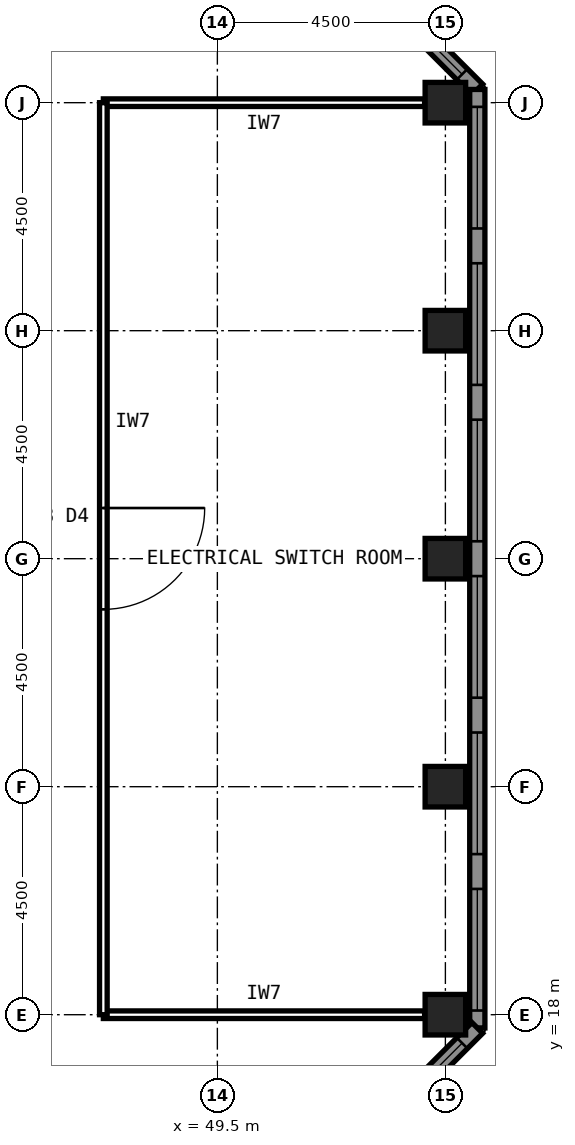
"""IFC4 building model, lengths in metres.
Left out: names, types, materials, properties, quantities, classifications, styles, units other than length and angle.
Written with IfcOpenShell. Run it as: python <this file> out.ifc"""

import sys

from ifc_helpers import new_model, si_unit, direction, frame, frame_2d, origin, origin_2d, place, context, subcontext, project, spatial, polyline, rectangle, hollow_rectangle, outline, extrude, element, fill, save


model = new_model("IFC4")
c1 = context("Model", 3, precision=1e-05, world=origin(), true_north=direction((0.0, 1.0)))
c2 = subcontext(c1, "Body", "Model", "MODEL_VIEW")
j1 = project(units=[si_unit("LENGTHUNIT", "METRE"), si_unit("PLANEANGLEUNIT", "RADIAN")], contexts=[c1])
p1 = place(None, origin())
s1 = spatial("IfcSite", under=j1, at=p1, CompositionType="ELEMENT")
p2 = place(p1, origin())
s2 = spatial("IfcBuilding", under=s1, at=p2, CompositionType="ELEMENT")
p3 = place(p2, frame((0.0, 0.0, 320.1)))
s3 = spatial("IfcBuildingStorey", under=s2, at=p3, CompositionType="ELEMENT", Elevation=320.1)
p4 = place(p3, frame((54.0, 18.0, 0.0), z_axis=(0.0, 0.0, 1.0), x_axis=(1.0, 0.0, 0.0)))
e1 = element("IfcColumn", 1, at=p4, inside=s3, PredefinedType="COLUMN", context=c2, shape_type="SweptSolid", body=[
    extrude(hollow_rectangle(XDim=0.8, YDim=0.8, WallThickness=0.045, at=origin_2d()), origin(), (0.0, 0.0, 1.0), 9.7),
])
p5 = place(p3, frame((54.0, 22.5, 0.0), z_axis=(0.0, 0.0, 1.0), x_axis=(1.0, 0.0, 0.0)))
e2 = element("IfcColumn", 2, at=p5, inside=s3, PredefinedType="COLUMN", context=c2, shape_type="SweptSolid", body=[
    extrude(hollow_rectangle(XDim=0.8, YDim=0.8, WallThickness=0.045, at=origin_2d()), origin(), (0.0, 0.0, 1.0), 11.977),
])
p6 = place(p3, frame((54.0, 27.0, 0.0), z_axis=(0.0, 0.0, 1.0), x_axis=(1.0, 0.0, 0.0)))
e3 = element("IfcColumn", 3, at=p6, inside=s3, PredefinedType="COLUMN", context=c2, shape_type="SweptSolid", body=[
    extrude(hollow_rectangle(XDim=0.8, YDim=0.8, WallThickness=0.045, at=origin_2d()), origin(), (0.0, 0.0, 1.0), 12.189),
])
p7 = place(p3, frame((54.0, 31.5, 0.0), z_axis=(0.0, 0.0, 1.0), x_axis=(1.0, 0.0, 0.0)))
e4 = element("IfcColumn", 4, at=p7, inside=s3, PredefinedType="COLUMN", context=c2, shape_type="SweptSolid", body=[
    extrude(hollow_rectangle(XDim=0.8, YDim=0.8, WallThickness=0.045, at=origin_2d()), origin(), (0.0, 0.0, 1.0), 14.677),
])
p8 = place(p3, frame((54.0, 36.0, 0.0), z_axis=(0.0, 0.0, 1.0), x_axis=(1.0, 0.0, 0.0)))
e5 = element("IfcColumn", 5, at=p8, inside=s3, PredefinedType="COLUMN", context=c2, shape_type="SweptSolid", body=[
    extrude(hollow_rectangle(XDim=0.8, YDim=0.8, WallThickness=0.045, at=origin_2d()), origin(), (0.0, 0.0, 1.0), 15.1),
])
p9 = place(p3, frame((36.261, 54.63, 0.0), z_axis=(0.0, 0.0, 1.0), x_axis=(0.707106781187, -0.707106781187, 0.0)))
e6 = element("IfcWall", 6, at=p9, inside=s3, PredefinedType="SOLIDWALL", context=c2, shape_type="SweptSolid", body=[
    extrude(outline(polyline([(0.0, 0.0), (25.978, 0.0), (25.978, 18.278), (0.0, 23.789), (0.0, 0.0)])), frame((0.0, 0.15, 0.0), z_axis=(0.0, -1.0, 0.0), x_axis=(1.0, 0.0, 0.0)), (0.0, 0.0, 1.0), 0.3),
])
p10 = place(p9, frame((0.424, 0.0, 1.2)))
e7 = element("IfcOpeningElement", 7, at=p10, cuts=e6, PredefinedType="OPENING", context=c2, shape_type="SweptSolid", body=[
    extrude(rectangle(XDim=2.4, YDim=2.4, at=frame_2d((1.2, 1.2))), frame((0.0, 0.16, 0.0), z_axis=(0.0, -1.0, 0.0), x_axis=(1.0, 0.0, 0.0)), (0.0, 0.0, 1.0), 0.32),
])
p11 = place(p9, frame((3.671, 0.0, 1.2)))
e8 = element("IfcOpeningElement", 8, at=p11, cuts=e6, PredefinedType="OPENING", context=c2, shape_type="SweptSolid", body=[
    extrude(rectangle(XDim=2.4, YDim=2.4, at=frame_2d((1.2, 1.2))), frame((0.0, 0.16, 0.0), z_axis=(0.0, -1.0, 0.0), x_axis=(1.0, 0.0, 0.0)), (0.0, 0.0, 1.0), 0.32),
])
p12 = place(p9, frame((6.918, 0.0, 11.3)))
e9 = element("IfcOpeningElement", 9, at=p12, cuts=e6, PredefinedType="OPENING", context=c2, shape_type="SweptSolid", body=[
    extrude(rectangle(XDim=2.4, YDim=2.4, at=frame_2d((1.2, 1.2))), frame((0.0, 0.16, 0.0), z_axis=(0.0, -1.0, 0.0), x_axis=(1.0, 0.0, 0.0)), (0.0, 0.0, 1.0), 0.32),
])
p13 = place(p9, frame((10.165, 0.0, 11.15)))
e10 = element("IfcOpeningElement", 10, at=p13, cuts=e6, PredefinedType="OPENING", context=c2, shape_type="SweptSolid", body=[
    extrude(rectangle(XDim=2.4, YDim=2.4, at=frame_2d((1.2, 1.2))), frame((0.0, 0.16, 0.0), z_axis=(0.0, -1.0, 0.0), x_axis=(1.0, 0.0, 0.0)), (0.0, 0.0, 1.0), 0.32),
])
p14 = place(p9, frame((13.412, 0.0, 1.2)))
e11 = element("IfcOpeningElement", 11, at=p14, cuts=e6, PredefinedType="OPENING", context=c2, shape_type="SweptSolid", body=[
    extrude(rectangle(XDim=2.4, YDim=2.4, at=frame_2d((1.2, 1.2))), frame((0.0, 0.16, 0.0), z_axis=(0.0, -1.0, 0.0), x_axis=(1.0, 0.0, 0.0)), (0.0, 0.0, 1.0), 0.32),
])
p15 = place(p9, frame((16.66, 0.0, 1.2)))
e12 = element("IfcOpeningElement", 12, at=p15, cuts=e6, PredefinedType="OPENING", context=c2, shape_type="SweptSolid", body=[
    extrude(rectangle(XDim=2.4, YDim=2.4, at=frame_2d((1.2, 1.2))), frame((0.0, 0.16, 0.0), z_axis=(0.0, -1.0, 0.0), x_axis=(1.0, 0.0, 0.0)), (0.0, 0.0, 1.0), 0.32),
])
p16 = place(p9, frame((19.907, 0.0, 1.2)))
e13 = element("IfcOpeningElement", 13, at=p16, cuts=e6, PredefinedType="OPENING", context=c2, shape_type="SweptSolid", body=[
    extrude(rectangle(XDim=2.4, YDim=2.4, at=frame_2d((1.2, 1.2))), frame((0.0, 0.16, 0.0), z_axis=(0.0, -1.0, 0.0), x_axis=(1.0, 0.0, 0.0)), (0.0, 0.0, 1.0), 0.32),
])
p17 = place(p9, frame((23.154, 0.0, 1.2)))
e14 = element("IfcOpeningElement", 14, at=p17, cuts=e6, PredefinedType="OPENING", context=c2, shape_type="SweptSolid", body=[
    extrude(rectangle(XDim=2.4, YDim=2.4, at=frame_2d((1.2, 1.2))), frame((0.0, 0.16, 0.0), z_axis=(0.0, -1.0, 0.0), x_axis=(1.0, 0.0, 0.0)), (0.0, 0.0, 1.0), 0.32),
])
p18 = place(p3, frame((54.63, 36.261, 0.0), z_axis=(0.0, 0.0, 1.0), x_axis=(0.0, -1.0, 0.0)))
e15 = element("IfcWall", 15, at=p18, inside=s3, PredefinedType="SOLIDWALL", context=c2, shape_type="SweptSolid", body=[
    extrude(outline(polyline([(0.0, 0.0), (18.522, 0.0), (18.522, 12.722), (0.0, 18.278), (0.0, 0.0)])), frame((0.0, 0.15, 0.0), z_axis=(0.0, -1.0, 0.0), x_axis=(1.0, 0.0, 0.0)), (0.0, 0.0, 1.0), 0.3),
])
p19 = place(p18, frame((0.344, 0.0, 11.4)))
e16 = element("IfcOpeningElement", 16, at=p19, cuts=e15, PredefinedType="OPENING", context=c2, shape_type="SweptSolid", body=[
    extrude(rectangle(XDim=2.4, YDim=2.4, at=frame_2d((1.2, 1.2))), frame((0.0, 0.16, 0.0), z_axis=(0.0, -1.0, 0.0), x_axis=(1.0, 0.0, 0.0)), (0.0, 0.0, 1.0), 0.32),
])
p20 = place(p18, frame((3.43, 0.0, 1.65)))
e17 = element("IfcOpeningElement", 17, at=p20, cuts=e15, PredefinedType="OPENING", context=c2, shape_type="SweptSolid", body=[
    extrude(rectangle(XDim=2.4, YDim=2.4, at=frame_2d((1.2, 1.2))), frame((0.0, 0.16, 0.0), z_axis=(0.0, -1.0, 0.0), x_axis=(1.0, 0.0, 0.0)), (0.0, 0.0, 1.0), 0.32),
])
p21 = place(p18, frame((6.518, 0.0, 1.2)))
e18 = element("IfcOpeningElement", 18, at=p21, cuts=e15, PredefinedType="OPENING", context=c2, shape_type="SweptSolid", body=[
    extrude(rectangle(XDim=2.4, YDim=2.4, at=frame_2d((1.2, 1.2))), frame((0.0, 0.16, 0.0), z_axis=(0.0, -1.0, 0.0), x_axis=(1.0, 0.0, 0.0)), (0.0, 0.0, 1.0), 0.32),
])
p22 = place(p18, frame((9.604, 0.0, 1.2)))
e19 = element("IfcOpeningElement", 19, at=p22, cuts=e15, PredefinedType="OPENING", context=c2, shape_type="SweptSolid", body=[
    extrude(rectangle(XDim=2.4, YDim=2.4, at=frame_2d((1.2, 1.2))), frame((0.0, 0.16, 0.0), z_axis=(0.0, -1.0, 0.0), x_axis=(1.0, 0.0, 0.0)), (0.0, 0.0, 1.0), 0.32),
])
p23 = place(p18, frame((12.691, 0.0, 1.65)))
e20 = element("IfcOpeningElement", 20, at=p23, cuts=e15, PredefinedType="OPENING", context=c2, shape_type="SweptSolid", body=[
    extrude(rectangle(XDim=2.4, YDim=2.4, at=frame_2d((1.2, 1.2))), frame((0.0, 0.16, 0.0), z_axis=(0.0, -1.0, 0.0), x_axis=(1.0, 0.0, 0.0)), (0.0, 0.0, 1.0), 0.32),
])
p24 = place(p18, frame((15.779, 0.0, 5.45)))
e21 = element("IfcOpeningElement", 21, at=p24, cuts=e15, PredefinedType="OPENING", context=c2, shape_type="SweptSolid", body=[
    extrude(rectangle(XDim=2.4, YDim=2.4, at=frame_2d((1.2, 1.2))), frame((0.0, 0.16, 0.0), z_axis=(0.0, -1.0, 0.0), x_axis=(1.0, 0.0, 0.0)), (0.0, 0.0, 1.0), 0.32),
])
p25 = place(p3, frame((54.63, 17.739, 0.0), z_axis=(0.0, 0.0, 1.0), x_axis=(-0.707106781187, -0.707106781187, 0.0)))
e22 = element("IfcWall", 22, at=p25, inside=s3, PredefinedType="SOLIDWALL", context=c2, shape_type="SweptSolid", body=[
    extrude(outline(polyline([(0.0, 0.0), (25.978, 0.0), (25.978, 7.211), (0.0, 12.722), (0.0, 0.0)])), frame((0.0, 0.15, 0.0), z_axis=(0.0, -1.0, 0.0), x_axis=(1.0, 0.0, 0.0)), (0.0, 0.0, 1.0), 0.3),
])
p26 = place(p25, frame((0.424, 0.0, 1.2)))
e23 = element("IfcOpeningElement", 23, at=p26, cuts=e22, PredefinedType="OPENING", context=c2, shape_type="SweptSolid", body=[
    extrude(rectangle(XDim=2.4, YDim=2.4, at=frame_2d((1.2, 1.2))), frame((0.0, 0.16, 0.0), z_axis=(0.0, -1.0, 0.0), x_axis=(1.0, 0.0, 0.0)), (0.0, 0.0, 1.0), 0.32),
])
p27 = place(p25, frame((3.671, 0.0, 1.2)))
e24 = element("IfcOpeningElement", 24, at=p27, cuts=e22, PredefinedType="OPENING", context=c2, shape_type="SweptSolid", body=[
    extrude(rectangle(XDim=2.4, YDim=2.4, at=frame_2d((1.2, 1.2))), frame((0.0, 0.16, 0.0), z_axis=(0.0, -1.0, 0.0), x_axis=(1.0, 0.0, 0.0)), (0.0, 0.0, 1.0), 0.32),
])
p28 = place(p25, frame((6.918, 0.0, 5.35)))
e25 = element("IfcOpeningElement", 25, at=p28, cuts=e22, PredefinedType="OPENING", context=c2, shape_type="SweptSolid", body=[
    extrude(rectangle(XDim=2.4, YDim=2.4, at=frame_2d((1.2, 1.2))), frame((0.0, 0.16, 0.0), z_axis=(0.0, -1.0, 0.0), x_axis=(1.0, 0.0, 0.0)), (0.0, 0.0, 1.0), 0.32),
])
p29 = place(p25, frame((10.165, 0.0, 5.25)))
e26 = element("IfcOpeningElement", 26, at=p29, cuts=e22, PredefinedType="OPENING", context=c2, shape_type="SweptSolid", body=[
    extrude(rectangle(XDim=2.4, YDim=2.4, at=frame_2d((1.2, 1.2))), frame((0.0, 0.16, 0.0), z_axis=(0.0, -1.0, 0.0), x_axis=(1.0, 0.0, 0.0)), (0.0, 0.0, 1.0), 0.32),
])
p30 = place(p25, frame((13.412, 0.0, 1.2)))
e27 = element("IfcOpeningElement", 27, at=p30, cuts=e22, PredefinedType="OPENING", context=c2, shape_type="SweptSolid", body=[
    extrude(rectangle(XDim=2.4, YDim=2.4, at=frame_2d((1.2, 1.2))), frame((0.0, 0.16, 0.0), z_axis=(0.0, -1.0, 0.0), x_axis=(1.0, 0.0, 0.0)), (0.0, 0.0, 1.0), 0.32),
])
p31 = place(p25, frame((16.66, 0.0, 1.2)))
e28 = element("IfcOpeningElement", 28, at=p31, cuts=e22, PredefinedType="OPENING", context=c2, shape_type="SweptSolid", body=[
    extrude(rectangle(XDim=2.4, YDim=2.4, at=frame_2d((1.2, 1.2))), frame((0.0, 0.16, 0.0), z_axis=(0.0, -1.0, 0.0), x_axis=(1.0, 0.0, 0.0)), (0.0, 0.0, 1.0), 0.32),
])
p32 = place(p25, frame((19.907, 0.0, 1.2)))
e29 = element("IfcOpeningElement", 29, at=p32, cuts=e22, PredefinedType="OPENING", context=c2, shape_type="SweptSolid", body=[
    extrude(rectangle(XDim=2.4, YDim=2.4, at=frame_2d((1.2, 1.2))), frame((0.0, 0.16, 0.0), z_axis=(0.0, -1.0, 0.0), x_axis=(1.0, 0.0, 0.0)), (0.0, 0.0, 1.0), 0.32),
])
p33 = place(p25, frame((23.154, 0.0, 1.2)))
e30 = element("IfcOpeningElement", 30, at=p33, cuts=e22, PredefinedType="OPENING", context=c2, shape_type="SweptSolid", body=[
    extrude(rectangle(XDim=2.4, YDim=2.4, at=frame_2d((1.2, 1.2))), frame((0.0, 0.16, 0.0), z_axis=(0.0, -1.0, 0.0), x_axis=(1.0, 0.0, 0.0)), (0.0, 0.0, 1.0), 0.32),
])
for number, where, z_axis, x_axis in (
    (31, (47.25, 18.0, 0.0), (0.0, 0.0, 1.0), (1.0, 0.0, 0.0)),
    (32, (53.59, 36.0, 0.0), (0.0, 0.0, 1.0), (-1.0, 0.0, 0.0)),
):
    element("IfcWall", number, at=place(p3, frame(where, z_axis=z_axis, x_axis=x_axis)), inside=s3, PredefinedType="PARTITIONING", context=c2, shape_type="SweptSolid", body=[
        extrude(rectangle(XDim=6.34, YDim=0.15, at=frame_2d((3.17, 0.0))), origin(), (0.0, 0.0, 1.0), 4.246),
    ])
p34 = place(p3, frame((47.25, 36.0, 0.0), z_axis=(0.0, 0.0, 1.0), x_axis=(0.0, -1.0, 0.0)))
e33 = element("IfcWall", 33, at=p34, inside=s3, PredefinedType="PARTITIONING", context=c2, shape_type="SweptSolid", body=[
    extrude(rectangle(XDim=18.0, YDim=0.15, at=frame_2d((9.0, 0.0))), origin(), (0.0, 0.0, 1.0), 4.246),
])
p35 = place(p34, frame((8.0, 0.0, 0.0)))
e34 = element("IfcOpeningElement", 34, at=p35, cuts=e33, PredefinedType="OPENING", context=c2, shape_type="SweptSolid", body=[
    extrude(rectangle(XDim=2.0, YDim=2.4, at=frame_2d((1.0, 1.2))), frame((0.0, 0.085, 0.0), z_axis=(0.0, -1.0, 0.0), x_axis=(1.0, 0.0, 0.0)), (0.0, 0.0, 1.0), 0.17),
])
p36 = place(p17, origin())
e35 = element("IfcWindow", 35, at=p36, inside=s3, PartitioningType="SINGLE_PANEL", PredefinedType="USERDEFINED", context=c2, shape_type="SweptSolid", body=[
    extrude(rectangle(XDim=2.4, YDim=2.4, at=frame_2d((1.2, 1.2))), frame((0.0, 0.03, 0.0), z_axis=(0.0, -1.0, 0.0), x_axis=(1.0, 0.0, 0.0)), (0.0, 0.0, 1.0), 0.06),
])
fill(e14, e35)
p37 = place(p19, origin())
e36 = element("IfcWindow", 36, at=p37, inside=s3, PartitioningType="SINGLE_PANEL", PredefinedType="USERDEFINED", context=c2, shape_type="SweptSolid", body=[
    extrude(rectangle(XDim=2.4, YDim=2.4, at=frame_2d((1.2, 1.2))), frame((0.0, 0.03, 0.0), z_axis=(0.0, -1.0, 0.0), x_axis=(1.0, 0.0, 0.0)), (0.0, 0.0, 1.0), 0.06),
])
fill(e16, e36)
p38 = place(p20, origin())
e37 = element("IfcWindow", 37, at=p38, inside=s3, PartitioningType="SINGLE_PANEL", PredefinedType="USERDEFINED", context=c2, shape_type="SweptSolid", body=[
    extrude(rectangle(XDim=2.4, YDim=2.4, at=frame_2d((1.2, 1.2))), frame((0.0, 0.03, 0.0), z_axis=(0.0, -1.0, 0.0), x_axis=(1.0, 0.0, 0.0)), (0.0, 0.0, 1.0), 0.06),
])
fill(e17, e37)
p39 = place(p21, origin())
e38 = element("IfcWindow", 38, at=p39, inside=s3, PartitioningType="SINGLE_PANEL", PredefinedType="USERDEFINED", context=c2, shape_type="SweptSolid", body=[
    extrude(rectangle(XDim=2.4, YDim=2.4, at=frame_2d((1.2, 1.2))), frame((0.0, 0.03, 0.0), z_axis=(0.0, -1.0, 0.0), x_axis=(1.0, 0.0, 0.0)), (0.0, 0.0, 1.0), 0.06),
])
fill(e18, e38)
p40 = place(p22, origin())
e39 = element("IfcWindow", 39, at=p40, inside=s3, PartitioningType="SINGLE_PANEL", PredefinedType="USERDEFINED", context=c2, shape_type="SweptSolid", body=[
    extrude(rectangle(XDim=2.4, YDim=2.4, at=frame_2d((1.2, 1.2))), frame((0.0, 0.03, 0.0), z_axis=(0.0, -1.0, 0.0), x_axis=(1.0, 0.0, 0.0)), (0.0, 0.0, 1.0), 0.06),
])
fill(e19, e39)
p41 = place(p23, origin())
e40 = element("IfcWindow", 40, at=p41, inside=s3, PartitioningType="SINGLE_PANEL", PredefinedType="USERDEFINED", context=c2, shape_type="SweptSolid", body=[
    extrude(rectangle(XDim=2.4, YDim=2.4, at=frame_2d((1.2, 1.2))), frame((0.0, 0.03, 0.0), z_axis=(0.0, -1.0, 0.0), x_axis=(1.0, 0.0, 0.0)), (0.0, 0.0, 1.0), 0.06),
])
fill(e20, e40)
p42 = place(p24, origin())
e41 = element("IfcWindow", 41, at=p42, inside=s3, PartitioningType="SINGLE_PANEL", PredefinedType="USERDEFINED", context=c2, shape_type="SweptSolid", body=[
    extrude(rectangle(XDim=2.4, YDim=2.4, at=frame_2d((1.2, 1.2))), frame((0.0, 0.03, 0.0), z_axis=(0.0, -1.0, 0.0), x_axis=(1.0, 0.0, 0.0)), (0.0, 0.0, 1.0), 0.06),
])
fill(e21, e41)
p43 = place(p26, origin())
e42 = element("IfcWindow", 42, at=p43, inside=s3, PartitioningType="SINGLE_PANEL", PredefinedType="USERDEFINED", context=c2, shape_type="SweptSolid", body=[
    extrude(rectangle(XDim=2.4, YDim=2.4, at=frame_2d((1.2, 1.2))), frame((0.0, 0.03, 0.0), z_axis=(0.0, -1.0, 0.0), x_axis=(1.0, 0.0, 0.0)), (0.0, 0.0, 1.0), 0.06),
])
fill(e23, e42)
p44 = place(p35, origin())
e43 = element("IfcDoor", 43, at=p44, inside=s3, OperationType="SINGLE_SWING_LEFT", PredefinedType="DOOR", context=c2, shape_type="SweptSolid", body=[
    extrude(rectangle(XDim=2.0, YDim=2.4, at=frame_2d((1.0, 1.2))), frame((0.0, 0.025, 0.0), z_axis=(0.0, -1.0, 0.0), x_axis=(1.0, 0.0, 0.0)), (0.0, 0.0, 1.0), 0.05),
])
fill(e34, e43)
save(model, sys.argv[1])
